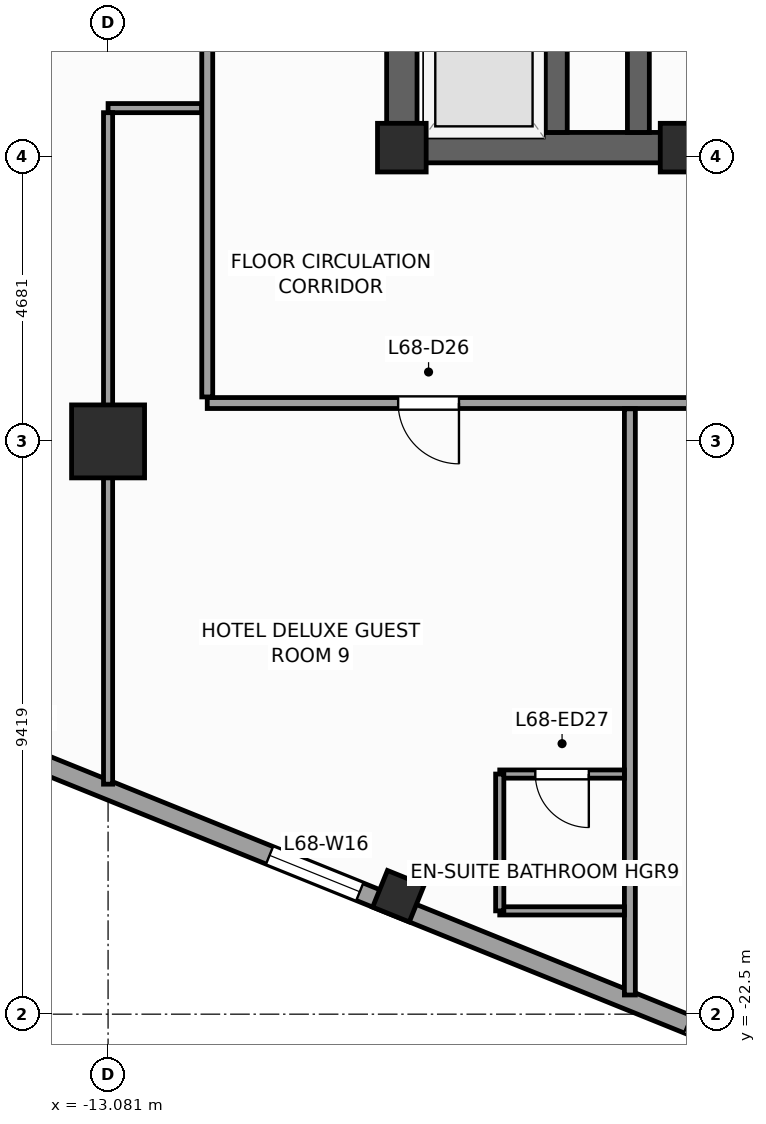
"""IFC4 building model, lengths in metres.
Left out: names, types, materials, properties, quantities, classifications, styles, units other than length and angle.
Written with IfcOpenShell. Run it as: python <this file> out.ifc"""

import sys

from ifc_helpers import new_model, si_unit, direction, frame, frame_2d, origin, origin_2d, place, context, subcontext, project, spatial, rectangle, extrude, source, transform, mapped, element, fill, save


model = new_model("IFC4")
c1 = context("Model", 3, precision=1e-05, world=origin(), true_north=direction((0.0, 1.0)))
c2 = subcontext(c1, "Body", "Model", "MODEL_VIEW")
j1 = project(units=[si_unit("LENGTHUNIT", "METRE"), si_unit("PLANEANGLEUNIT", "RADIAN")], contexts=[c1])
p1 = place(None, origin())
s1 = spatial("IfcSite", under=j1, at=p1, CompositionType="ELEMENT")
p2 = place(p1, origin())
s2 = spatial("IfcBuilding", under=s1, at=p2, CompositionType="ELEMENT")
p3 = place(p2, frame((0.0, 0.0, 279.6)))
s3 = spatial("IfcBuildingStorey", under=s2, at=p3, CompositionType="ELEMENT", Elevation=279.6)
p4 = place(p3, frame((-8.5, -8.25, 0.0), z_axis=(0.0, 0.0, 1.0), x_axis=(1.0, 0.0, 0.0)))
e1 = element("IfcWall", 1, at=p4, inside=s3, PredefinedType="SHEAR", context=c2, shape_type="SweptSolid", body=[
    extrude(rectangle(XDim=17.0, YDim=0.5, at=frame_2d((8.5, 0.0))), origin(), (0.0, 0.0, 1.0), 3.6),
])
p5 = place(p4, frame((7.85, 0.0, 0.0)))
e2 = element("IfcOpeningElement", 2, at=p5, cuts=e1, PredefinedType="OPENING", context=c2, shape_type="SweptSolid", body=[
    extrude(rectangle(XDim=1.3, YDim=2.2, at=frame_2d((0.65, 1.1))), frame((0.0, 0.26, 0.0), z_axis=(0.0, -1.0, 0.0), x_axis=(1.0, 0.0, 0.0)), (0.0, 0.0, 1.0), 0.52),
])
p6 = place(p3, frame((-8.25, -8.0, 0.0), z_axis=(0.0, 0.0, 1.0), x_axis=(0.0, 1.0, 0.0)))
e3 = element("IfcWall", 3, at=p6, inside=s3, PredefinedType="SHEAR", context=c2, shape_type="SweptSolid", body=[
    extrude(rectangle(XDim=16.0, YDim=0.5, at=frame_2d((8.0, 0.0))), origin(), (0.0, 0.0, 1.0), 3.6),
])
p7 = place(p6, frame((4.69, 0.0, 0.0)))
e4 = element("IfcOpeningElement", 4, at=p7, cuts=e3, PredefinedType="OPENING", context=c2, shape_type="SweptSolid", body=[
    extrude(rectangle(XDim=1.3, YDim=2.2, at=frame_2d((0.65, 1.1))), frame((0.0, 0.26, 0.0), z_axis=(0.0, -1.0, 0.0), x_axis=(1.0, 0.0, 0.0)), (0.0, 0.0, 1.0), 0.52),
])
p8 = place(p3, frame((-4.36, -8.0, 0.0), z_axis=(0.0, 0.0, 1.0), x_axis=(0.0, 1.0, 0.0)))
e5 = element("IfcWall", 5, at=p8, inside=s3, PredefinedType="SHEAR", context=c2, shape_type="SweptSolid", body=[
    extrude(rectangle(XDim=16.0, YDim=0.36, at=frame_2d((8.0, 0.0))), origin(), (0.0, 0.0, 1.0), 3.6),
])
p9 = place(p3, frame((-5.71, -8.0, 0.0), z_axis=(0.0, 0.0, 1.0), x_axis=(0.0, 1.0, 0.0)))
e6 = element("IfcWall", 6, at=p9, inside=s3, PredefinedType="SHEAR", context=c2, shape_type="SweptSolid", body=[
    extrude(rectangle(XDim=2.54, YDim=0.36, at=frame_2d((1.27, 0.0))), origin(), (0.0, 0.0, 1.0), 3.6),
])
m1 = source(origin(), c2, "Body", "SweptSolid", [
    extrude(rectangle(XDim=0.8, YDim=0.8, at=origin_2d()), origin(), (0.0, 0.0, 1.0), 3.6),
])
for number, where, z_axis, x_axis in (
    (7, (-8.25, -8.25, 0.0), (0.0, 0.0, 1.0), (1.0, 0.0, 0.0)),
    (8, (-3.6, -8.25, 0.0), (0.0, 0.0, 1.0), (1.0, 0.0, 0.0)),
):
    element("IfcColumn", number, at=place(p3, frame(where, z_axis=z_axis, x_axis=x_axis)), inside=s3, PredefinedType="PILASTER", context=c2, shape_type="MappedRepresentation", body=[
        mapped(m1, transform((0.0, 0.0, 0.0), scale=1.0)),
    ])
m2 = source(origin(), c2, "Body", "SweptSolid", [
    extrude(rectangle(XDim=1.2, YDim=1.2, at=origin_2d()), origin(), (0.0, 0.0, 1.0), 3.6),
])
p10 = place(p3, frame((-13.081, -13.081, 0.0), z_axis=(0.0, 0.0, 1.0), x_axis=(1.0, 0.0, 0.0)))
e9 = element("IfcColumn", 9, at=p10, inside=s3, PredefinedType="COLUMN", context=c2, shape_type="MappedRepresentation", body=[
    mapped(m2, transform((0.0, 0.0, 0.0), scale=1.0)),
])
m3 = source(origin(), c2, "Body", "SweptSolid", [
    extrude(rectangle(XDim=0.65, YDim=0.65, at=origin_2d()), origin(), (0.0, 0.0, 1.0), 3.6),
])
p11 = place(p3, frame((-8.307, -20.56, 0.0), z_axis=(0.0, 0.0, 1.0), x_axis=(0.374606593416, 0.927183854567, 0.0)))
e10 = element("IfcColumn", 10, at=p11, inside=s3, PredefinedType="COLUMN", context=c2, shape_type="MappedRepresentation", body=[
    mapped(m3, transform((0.0, 0.0, 0.0), scale=1.0)),
])
p12 = place(p3, frame((-23.813, -14.479, 0.0), z_axis=(0.0, 0.0, 1.0), x_axis=(0.927182657188, -0.374609557019, 0.0)))
e11 = element("IfcWall", 11, at=p12, inside=s3, PredefinedType="STANDARD", context=c2, shape_type="SweptSolid", body=[
    extrude(rectangle(XDim=33.31, YDim=0.31, at=frame_2d((16.655, 0.0))), origin(), (0.0, 0.0, 1.0), 2.75),
])
p13 = place(p12, frame((3.197, 0.0, 0.47)))
e12 = element("IfcOpeningElement", 12, at=p13, cuts=e11, PredefinedType="OPENING", context=c2, shape_type="SweptSolid", body=[
    extrude(rectangle(XDim=1.6, YDim=2.1, at=frame_2d((0.8, 1.05))), frame((0.0, 0.165, 0.0), z_axis=(0.0, -1.0, 0.0), x_axis=(1.0, 0.0, 0.0)), (0.0, 0.0, 1.0), 0.33),
])
p14 = place(p12, frame((8.86, 0.0, 0.47)))
e13 = element("IfcOpeningElement", 13, at=p14, cuts=e11, PredefinedType="OPENING", context=c2, shape_type="SweptSolid", body=[
    extrude(rectangle(XDim=1.6, YDim=2.1, at=frame_2d((0.8, 1.05))), frame((0.0, 0.165, 0.0), z_axis=(0.0, -1.0, 0.0), x_axis=(1.0, 0.0, 0.0)), (0.0, 0.0, 1.0), 0.33),
])
p15 = place(p12, frame((14.439, 0.0, 0.47)))
e14 = element("IfcOpeningElement", 14, at=p15, cuts=e11, PredefinedType="OPENING", context=c2, shape_type="SweptSolid", body=[
    extrude(rectangle(XDim=1.6, YDim=2.1, at=frame_2d((0.8, 1.05))), frame((0.0, 0.165, 0.0), z_axis=(0.0, -1.0, 0.0), x_axis=(1.0, 0.0, 0.0)), (0.0, 0.0, 1.0), 0.33),
])
p16 = place(p12, frame((21.851, 0.0, 0.47)))
e15 = element("IfcOpeningElement", 15, at=p16, cuts=e11, PredefinedType="OPENING", context=c2, shape_type="SweptSolid", body=[
    extrude(rectangle(XDim=1.6, YDim=2.1, at=frame_2d((0.8, 1.05))), frame((0.0, 0.165, 0.0), z_axis=(0.0, -1.0, 0.0), x_axis=(1.0, 0.0, 0.0)), (0.0, 0.0, 1.0), 0.33),
])
p17 = place(p12, frame((27.847, 0.0, 0.47)))
e16 = element("IfcOpeningElement", 16, at=p17, cuts=e11, PredefinedType="OPENING", context=c2, shape_type="SweptSolid", body=[
    extrude(rectangle(XDim=1.6, YDim=2.1, at=frame_2d((0.8, 1.05))), frame((0.0, 0.165, 0.0), z_axis=(0.0, -1.0, 0.0), x_axis=(1.0, 0.0, 0.0)), (0.0, 0.0, 1.0), 0.33),
])
p18 = place(p3, frame((-11.45, -12.45, 0.0), z_axis=(0.0, 0.0, 1.0), x_axis=(1.0, 0.0, 0.0)))
e17 = element("IfcWall", 17, at=p18, inside=s3, PredefinedType="PARTITIONING", context=c2, shape_type="SweptSolid", body=[
    extrude(rectangle(XDim=21.75, YDim=0.18, at=frame_2d((10.875, 0.0))), origin(), (0.0, 0.0, 1.0), 3.35),
])
p19 = place(p18, frame((12.436, 0.0, 0.0)))
e18 = element("IfcOpeningElement", 18, at=p19, cuts=e17, PredefinedType="OPENING", context=c2, shape_type="SweptSolid", body=[
    extrude(rectangle(XDim=0.95, YDim=2.1, at=frame_2d((0.475, 1.05))), frame((0.0, 0.1, 0.0), z_axis=(0.0, -1.0, 0.0), x_axis=(1.0, 0.0, 0.0)), (0.0, 0.0, 1.0), 0.2),
])
p20 = place(p18, frame((18.186, 0.0, 0.0)))
e19 = element("IfcOpeningElement", 19, at=p20, cuts=e17, PredefinedType="OPENING", context=c2, shape_type="SweptSolid", body=[
    extrude(rectangle(XDim=1.0, YDim=2.15, at=frame_2d((0.5, 1.075))), frame((0.0, 0.1, 0.0), z_axis=(0.0, -1.0, 0.0), x_axis=(1.0, 0.0, 0.0)), (0.0, 0.0, 1.0), 0.2),
])
p21 = place(p18, frame((14.5, 0.0, 0.0)))
e20 = element("IfcOpeningElement", 20, at=p21, cuts=e17, PredefinedType="OPENING", context=c2, shape_type="SweptSolid", body=[
    extrude(rectangle(XDim=1.0, YDim=2.15, at=frame_2d((0.5, 1.075))), frame((0.0, 0.1, 0.0), z_axis=(0.0, -1.0, 0.0), x_axis=(1.0, 0.0, 0.0)), (0.0, 0.0, 1.0), 0.2),
])
p22 = place(p18, frame((8.7, 0.0, 0.0)))
e21 = element("IfcOpeningElement", 21, at=p22, cuts=e17, PredefinedType="OPENING", context=c2, shape_type="SweptSolid", body=[
    extrude(rectangle(XDim=1.0, YDim=2.15, at=frame_2d((0.5, 1.075))), frame((0.0, 0.1, 0.0), z_axis=(0.0, -1.0, 0.0), x_axis=(1.0, 0.0, 0.0)), (0.0, 0.0, 1.0), 0.2),
])
p23 = place(p18, frame((3.139, 0.0, 0.0)))
e22 = element("IfcOpeningElement", 22, at=p23, cuts=e17, PredefinedType="OPENING", context=c2, shape_type="SweptSolid", body=[
    extrude(rectangle(XDim=1.0, YDim=2.15, at=frame_2d((0.5, 1.075))), frame((0.0, 0.1, 0.0), z_axis=(0.0, -1.0, 0.0), x_axis=(1.0, 0.0, 0.0)), (0.0, 0.0, 1.0), 0.2),
])
p24 = place(p3, frame((-11.45, -12.35, 0.0), z_axis=(0.0, 0.0, 1.0), x_axis=(0.0, 1.0, 0.0)))
e23 = element("IfcWall", 23, at=p24, inside=s3, PredefinedType="PARTITIONING", context=c2, shape_type="SweptSolid", body=[
    extrude(rectangle(XDim=23.7, YDim=0.18, at=frame_2d((11.85, 0.0))), origin(), (0.0, 0.0, 1.0), 3.35),
])
p25 = place(p24, frame((13.75, 0.0, 0.0)))
e24 = element("IfcOpeningElement", 24, at=p25, cuts=e23, PredefinedType="OPENING", context=c2, shape_type="SweptSolid", body=[
    extrude(rectangle(XDim=1.0, YDim=2.15, at=frame_2d((0.5, 1.075))), frame((0.0, 0.1, 0.0), z_axis=(0.0, -1.0, 0.0), x_axis=(1.0, 0.0, 0.0)), (0.0, 0.0, 1.0), 0.2),
])
p26 = place(p24, frame((17.55, 0.0, 0.0)))
e25 = element("IfcOpeningElement", 25, at=p26, cuts=e23, PredefinedType="OPENING", context=c2, shape_type="SweptSolid", body=[
    extrude(rectangle(XDim=1.0, YDim=2.15, at=frame_2d((0.5, 1.075))), frame((0.0, 0.1, 0.0), z_axis=(0.0, -1.0, 0.0), x_axis=(1.0, 0.0, 0.0)), (0.0, 0.0, 1.0), 0.2),
])
p27 = place(p24, frame((6.15, 0.0, 0.0)))
e26 = element("IfcOpeningElement", 26, at=p27, cuts=e23, PredefinedType="OPENING", context=c2, shape_type="SweptSolid", body=[
    extrude(rectangle(XDim=1.0, YDim=2.15, at=frame_2d((0.5, 1.075))), frame((0.0, 0.1, 0.0), z_axis=(0.0, -1.0, 0.0), x_axis=(1.0, 0.0, 0.0)), (0.0, 0.0, 1.0), 0.2),
])
p28 = place(p24, frame((9.95, 0.0, 0.0)))
e27 = element("IfcOpeningElement", 27, at=p28, cuts=e23, PredefinedType="OPENING", context=c2, shape_type="SweptSolid", body=[
    extrude(rectangle(XDim=1.0, YDim=2.15, at=frame_2d((0.5, 1.075))), frame((0.0, 0.1, 0.0), z_axis=(0.0, -1.0, 0.0), x_axis=(1.0, 0.0, 0.0)), (0.0, 0.0, 1.0), 0.2),
])
p29 = place(p3, frame((-4.5, -12.545, 0.0), z_axis=(0.0, 0.0, 1.0), x_axis=(0.0, -1.0, 0.0)))
e28 = element("IfcWall", 28, at=p29, inside=s3, PredefinedType="PARTITIONING", context=c2, shape_type="SweptSolid", body=[
    extrude(rectangle(XDim=9.64, YDim=0.18, at=frame_2d((4.82, 0.0))), origin(), (0.0, 0.0, 1.0), 3.35),
])
p30 = place(p3, frame((-11.545, -7.6, 0.0), z_axis=(0.0, 0.0, 1.0), x_axis=(-1.0, 0.0, 0.0)))
e29 = element("IfcWall", 29, at=p30, inside=s3, PredefinedType="PARTITIONING", context=c2, shape_type="SweptSolid", body=[
    extrude(rectangle(XDim=1.536, YDim=0.15, at=frame_2d((0.768, 0.0))), origin(), (0.0, 0.0, 1.0), 3.35),
])
p31 = place(p3, frame((-13.081, -7.675, 0.0), z_axis=(0.0, 0.0, 1.0), x_axis=(0.0, -1.0, 0.0)))
e30 = element("IfcWall", 30, at=p31, inside=s3, PredefinedType="PARTITIONING", context=c2, shape_type="SweptSolid", body=[
    extrude(rectangle(XDim=11.043, YDim=0.15, at=frame_2d((5.521, 0.0))), origin(), (0.0, 0.0, 1.0), 2.45),
])
p32 = place(p3, frame((-6.64, -20.801, 0.0), z_axis=(0.0, 0.0, 1.0), x_axis=(1.0, 0.0, 0.0)))
e31 = element("IfcWall", 31, at=p32, inside=s3, PredefinedType="PARTITIONING", context=c2, shape_type="SweptSolid", body=[
    extrude(rectangle(XDim=2.05, YDim=0.135, at=frame_2d((1.025, 0.0))), origin(), (0.0, 0.0, 1.0), 3.35),
])
p33 = place(p3, frame((-6.64, -18.551, 0.0), z_axis=(0.0, 0.0, 1.0), x_axis=(1.0, 0.0, 0.0)))
e32 = element("IfcWall", 32, at=p33, inside=s3, PredefinedType="PARTITIONING", context=c2, shape_type="SweptSolid", body=[
    extrude(rectangle(XDim=2.05, YDim=0.135, at=frame_2d((1.025, 0.0))), origin(), (0.0, 0.0, 1.0), 2.95),
])
p34 = place(p33, frame((0.585, 0.0, 0.0)))
e33 = element("IfcOpeningElement", 33, at=p34, cuts=e32, PredefinedType="OPENING", context=c2, shape_type="SweptSolid", body=[
    extrude(rectangle(XDim=0.88, YDim=2.1, at=frame_2d((0.44, 1.05))), frame((0.0, 0.078, 0.0), z_axis=(0.0, -1.0, 0.0), x_axis=(1.0, 0.0, 0.0)), (0.0, 0.0, 1.0), 0.155),
])
p35 = place(p3, frame((-6.64, -20.801, 0.0), z_axis=(0.0, 0.0, 1.0), x_axis=(0.0, 1.0, 0.0)))
e34 = element("IfcWall", 34, at=p35, inside=s3, PredefinedType="PARTITIONING", context=c2, shape_type="SweptSolid", body=[
    extrude(rectangle(XDim=2.25, YDim=0.135, at=frame_2d((1.125, 0.0))), origin(), (0.0, 0.0, 1.0), 3.35),
])
m4 = source(origin(), c2, "Body", "SweptSolid", [
    extrude(rectangle(XDim=1.6, YDim=2.1, at=frame_2d((0.8, 1.05))), frame((0.0, 0.03, 0.0), z_axis=(0.0, -1.0, 0.0), x_axis=(1.0, 0.0, 0.0)), (0.0, 0.0, 1.0), 0.06),
])
p36 = place(p15, origin())
e35 = element("IfcWindow", 35, at=p36, inside=s3, PartitioningType="SINGLE_PANEL", PredefinedType="WINDOW", context=c2, shape_type="MappedRepresentation", body=[
    mapped(m4, transform((0.0, 0.0, 0.0), scale=1.0)),
])
fill(e14, e35)
m5 = source(origin(), c2, "Body", "SweptSolid", [
    extrude(rectangle(XDim=1.0, YDim=2.15, at=frame_2d((0.5, 1.075))), frame((0.0, 0.025, 0.0), z_axis=(0.0, -1.0, 0.0), x_axis=(1.0, 0.0, 0.0)), (0.0, 0.0, 1.0), 0.05),
])
p37 = place(p23, frame((1.0, 0.0, 0.0), z_axis=(0.0, 0.0, 1.0), x_axis=(-1.0, 0.0, 0.0)))
e36 = element("IfcDoor", 36, at=p37, inside=s3, OperationType="SINGLE_SWING_RIGHT", PredefinedType="DOOR", context=c2, shape_type="MappedRepresentation", body=[
    mapped(m5, transform((0.0, 0.0, 0.0), scale=1.0)),
])
fill(e22, e36)
m6 = source(origin(), c2, "Body", "SweptSolid", [
    extrude(rectangle(XDim=0.88, YDim=2.1, at=frame_2d((0.44, 1.05))), frame((0.0, 0.025, 0.0), z_axis=(0.0, -1.0, 0.0), x_axis=(1.0, 0.0, 0.0)), (0.0, 0.0, 1.0), 0.05),
])
p38 = place(p34, frame((0.88, 0.0, 0.0), z_axis=(0.0, 0.0, 1.0), x_axis=(-1.0, 0.0, 0.0)))
e37 = element("IfcDoor", 37, at=p38, inside=s3, OperationType="SINGLE_SWING_RIGHT", PredefinedType="DOOR", context=c2, shape_type="MappedRepresentation", body=[
    mapped(m6, transform((0.0, 0.0, 0.0), scale=1.0)),
])
fill(e33, e37)
save(model, sys.argv[1])
